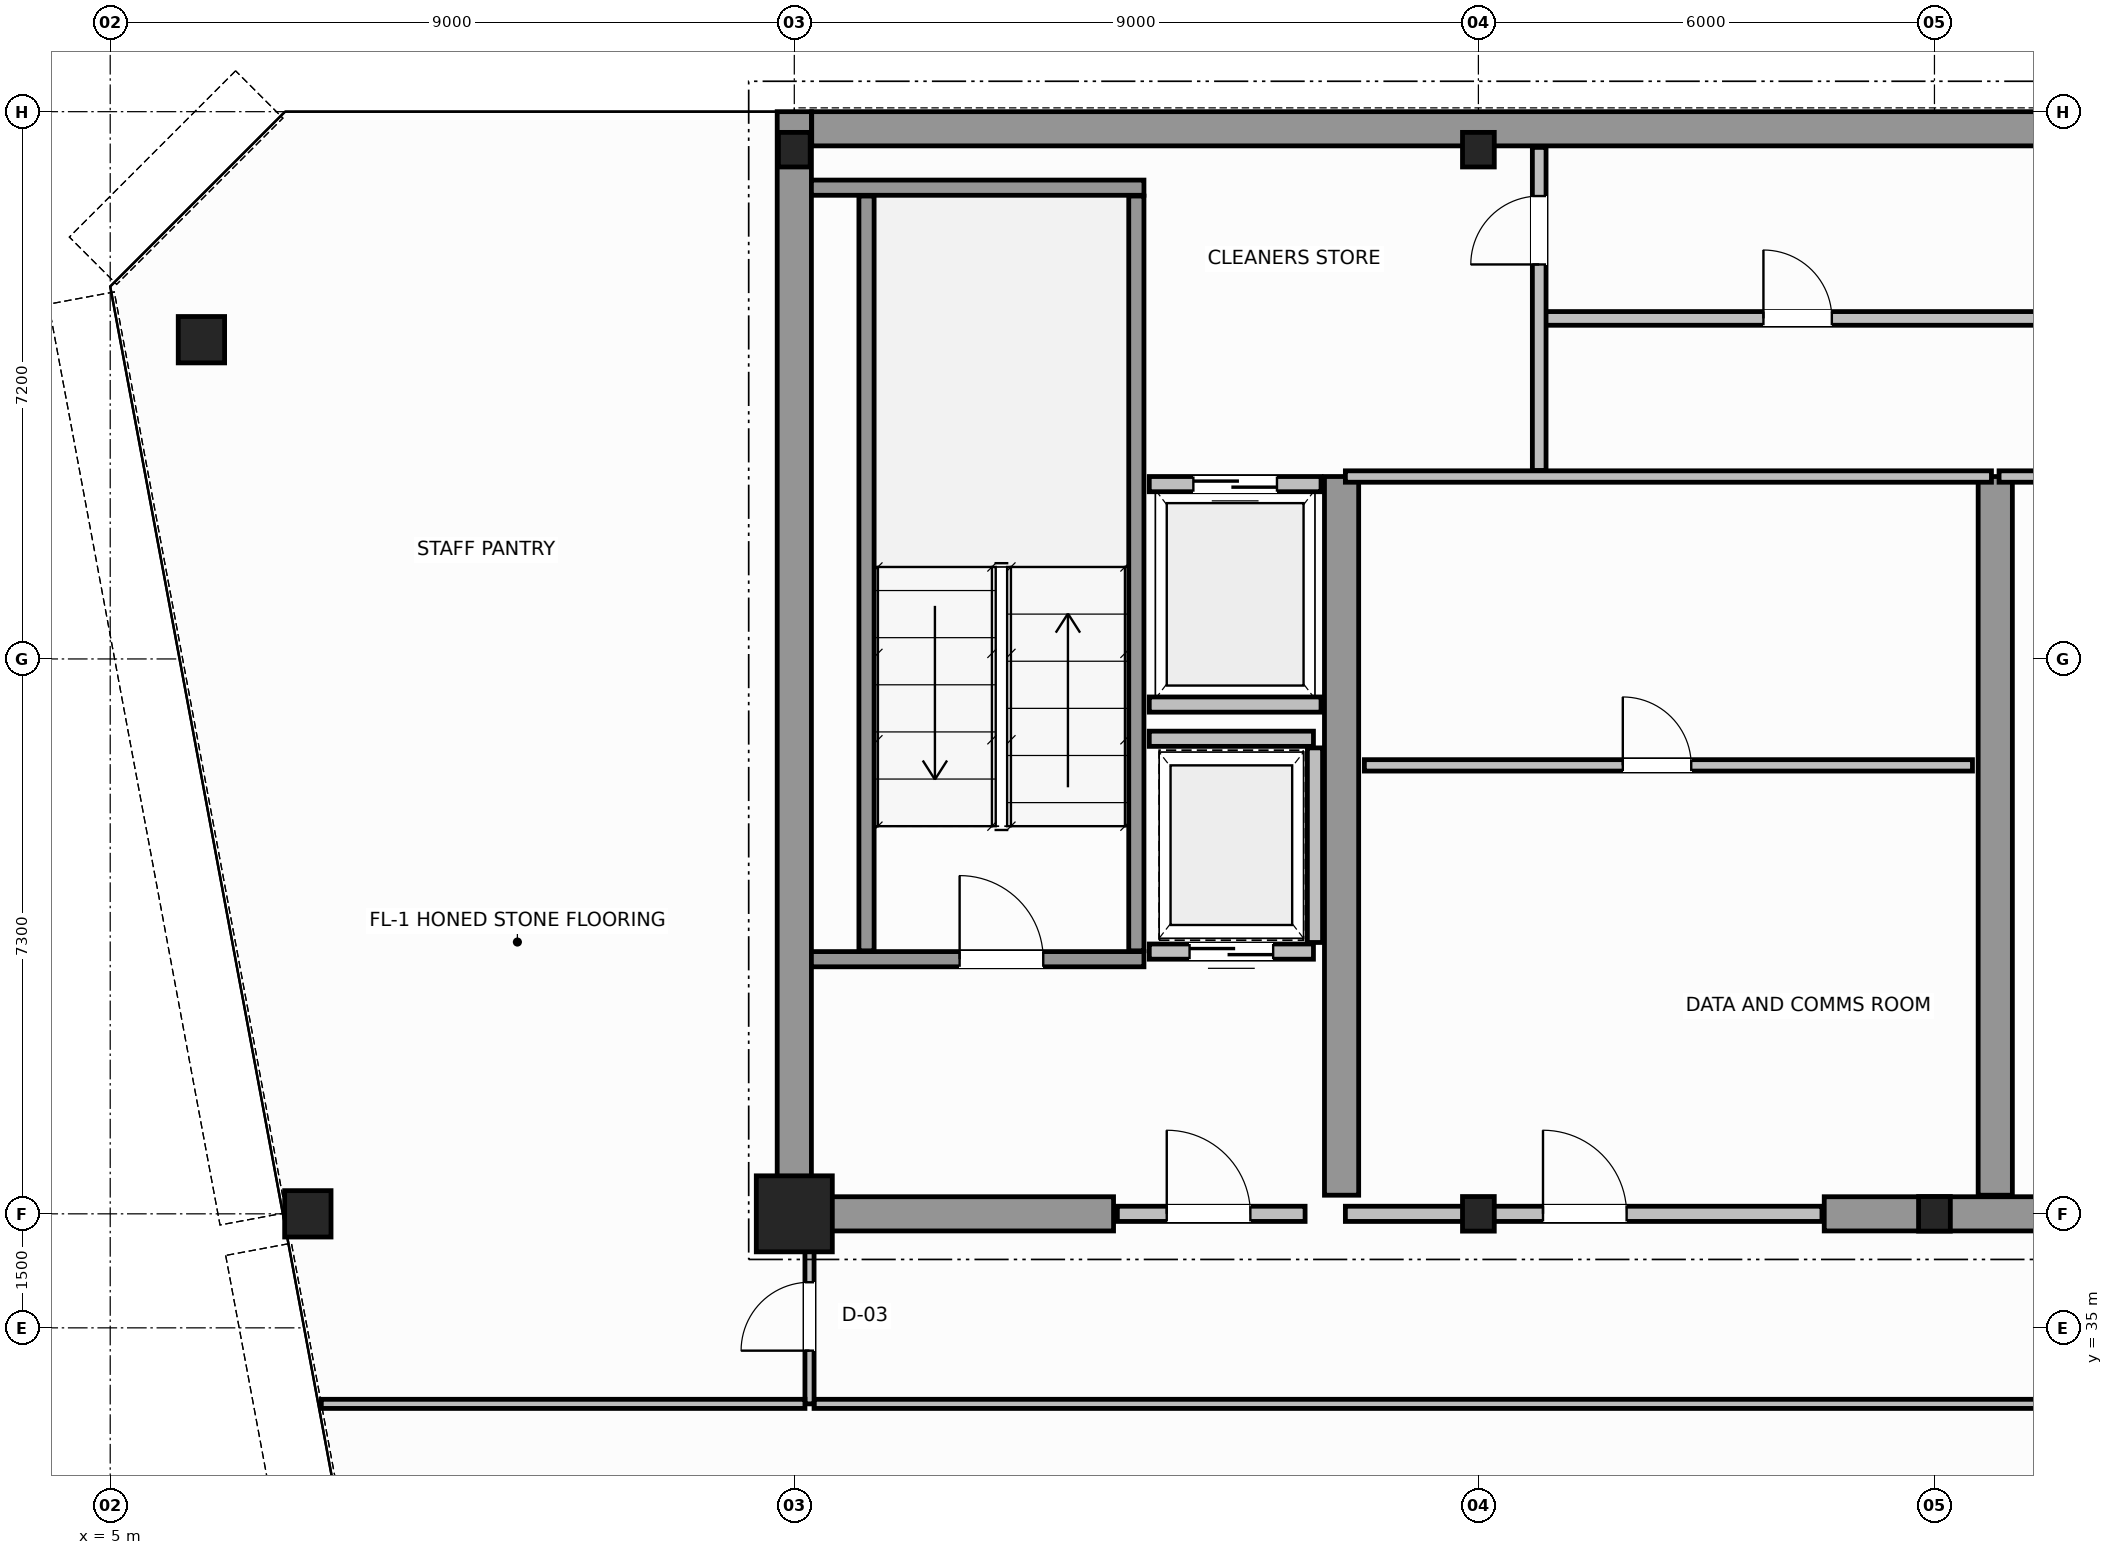
"""IFC4 building model, lengths in metres.
Left out: names, types, materials, properties, quantities, classifications, styles, units other than length and angle.
Written with IfcOpenShell. Run it as: python <this file> out.ifc"""

import sys

from ifc_helpers import new_model, si_unit, direction, frame, frame_2d, origin, origin_2d, place, context, subcontext, project, spatial, rectangle, hollow_circle, i_section, extrude, source, transform, mapped, element, fill, save


model = new_model("IFC4")
c1 = context("Model", 3, precision=1e-05, world=origin(), true_north=direction((0.0, 1.0)))
c2 = subcontext(c1, "Body", "Model", "MODEL_VIEW")
j1 = project(units=[si_unit("LENGTHUNIT", "METRE"), si_unit("PLANEANGLEUNIT", "RADIAN")], contexts=[c1])
p1 = place(None, origin())
s1 = spatial("IfcSite", under=j1, at=p1, CompositionType="ELEMENT")
p2 = place(p1, origin())
s2 = spatial("IfcBuilding", under=s1, at=p2, CompositionType="ELEMENT")
p3 = place(p2, frame((0.0, 0.0, 261.2)))
s3 = spatial("IfcBuildingStorey", under=s2, at=p3, CompositionType="ELEMENT", Elevation=261.2)
m1 = source(origin(), c2, "Body", "SweptSolid", [
    extrude(rectangle(XDim=1.0, YDim=1.0, at=origin_2d()), origin(), (0.0, 0.0, 1.0), 3.8),
])
p4 = place(p3, frame((14.0, 36.5, 0.0), z_axis=(0.0, 0.0, 1.0), x_axis=(1.0, 0.0, 0.0)))
e1 = element("IfcColumn", 1, at=p4, inside=s3, PredefinedType="COLUMN", context=c2, shape_type="MappedRepresentation", body=[
    mapped(m1, transform((0.0, 0.0, 0.0), scale=1.0)),
])
m2 = source(origin(), c2, "Body", "SweptSolid", [
    extrude(i_section(OverallWidth=0.418, OverallDepth=0.455, WebThickness=0.042, FlangeThickness=0.058, FilletRadius=0.015, at=origin_2d()), origin(), (0.0, 0.0, 1.0), 3.8),
])
for number, where, z_axis, x_axis in (
    (2, (23.0, 36.5, 0.0), (0.0, 0.0, 1.0), (1.0, 0.0, 0.0)),
    (3, (29.0, 36.5, 0.0), (0.0, 0.0, 1.0), (1.0, 0.0, 0.0)),
    (4, (14.0, 50.5, 0.0), (0.0, 0.0, 1.0), (1.0, 0.0, 0.0)),
    (5, (23.0, 50.5, 0.0), (0.0, 0.0, 1.0), (1.0, 0.0, 0.0)),
):
    element("IfcColumn", number, at=place(p3, frame(where, z_axis=z_axis, x_axis=x_axis)), inside=s3, PredefinedType="COLUMN", context=c2, shape_type="MappedRepresentation", body=[
        mapped(m2, transform((0.0, 0.0, 0.0), scale=1.0)),
    ])
m3 = source(origin(), c2, "Body", "SweptSolid", [
    extrude(hollow_circle(Radius=0.305, WallThickness=0.03, at=origin_2d()), origin(), (0.0, 0.0, 1.0), 3.8),
])
for number, where, z_axis, x_axis in (
    (6, (6.2, 48.0, 0.0), (0.0, 0.0, 1.0), (1.0, 0.0, 0.0)),
    (7, (7.6, 36.5, 0.0), (0.0, 0.0, 1.0), (1.0, 0.0, 0.0)),
):
    element("IfcColumn", number, at=place(p3, frame(where, z_axis=z_axis, x_axis=x_axis)), inside=s3, PredefinedType="COLUMN", context=c2, shape_type="MappedRepresentation", body=[
        mapped(m3, transform((0.0, 0.0, 0.0), scale=1.0)),
    ])
p5 = place(p3, frame((14.229, 50.775, 0.0), z_axis=(0.0, 0.0, 1.0), x_axis=(1.0, 0.0, 0.0)))
e8 = element("IfcWall", 8, at=p5, inside=s3, PredefinedType="SHEAR", context=c2, shape_type="SweptSolid", body=[
    extrude(rectangle(XDim=19.769, YDim=0.45, at=frame_2d((9.885, 0.0))), origin(), (0.0, 0.0, 1.0), 3.8),
])
p6 = place(p3, frame((14.0, 36.5, 0.0), z_axis=(0.0, 0.0, 1.0), x_axis=(0.0, 1.0, 0.0)))
e9 = element("IfcWall", 9, at=p6, inside=s3, PredefinedType="SHEAR", context=c2, shape_type="SweptSolid", body=[
    extrude(rectangle(XDim=14.5, YDim=0.45, at=frame_2d((7.25, 0.0))), origin(), (0.0, 0.0, 1.0), 3.8),
])
p7 = place(p3, frame((14.245, 36.5, 0.0), z_axis=(0.0, 0.0, 1.0), x_axis=(1.0, 0.0, 0.0)))
e10 = element("IfcWall", 10, at=p7, inside=s3, PredefinedType="SHEAR", context=c2, shape_type="SweptSolid", body=[
    extrude(rectangle(XDim=3.955, YDim=0.45, at=frame_2d((1.978, 0.0))), origin(), (0.0, 0.0, 1.0), 2.58),
])
p8 = place(p3, frame((27.55, 36.5, 0.0), z_axis=(0.0, 0.0, 1.0), x_axis=(1.0, 0.0, 0.0)))
e11 = element("IfcWall", 11, at=p8, inside=s3, PredefinedType="SHEAR", context=c2, shape_type="SweptSolid", body=[
    extrude(rectangle(XDim=4.5, YDim=0.45, at=frame_2d((2.25, 0.0))), origin(), (0.0, 0.0, 1.0), 3.8),
])
for number, where, z_axis, x_axis in (
    (12, (21.2, 36.745, 0.0), (0.0, 0.0, 1.0), (0.0, 1.0, 0.0)),
    (13, (29.8, 36.745, 0.0), (0.0, 0.0, 1.0), (0.0, 1.0, 0.0)),
):
    element("IfcWall", number, at=place(p3, frame(where, z_axis=z_axis, x_axis=x_axis)), inside=s3, PredefinedType="SHEAR", context=c2, shape_type="SweptSolid", body=[
        extrude(rectangle(XDim=9.455, YDim=0.45, at=frame_2d((4.728, 0.0))), origin(), (0.0, 0.0, 1.0), 3.8),
    ])
p9 = place(p3, frame((14.225, 39.85, 0.0), z_axis=(0.0, 0.0, 1.0), x_axis=(1.0, 0.0, 0.0)))
e14 = element("IfcWall", 14, at=p9, inside=s3, PredefinedType="SOLIDWALL", context=c2, shape_type="SweptSolid", body=[
    extrude(rectangle(XDim=4.375, YDim=0.2, at=frame_2d((2.188, 0.0))), origin(), (0.0, 0.0, 1.0), 3.8),
])
p10 = place(p9, frame((1.95, 0.0, 0.0)))
e15 = element("IfcOpeningElement", 15, at=p10, cuts=e14, PredefinedType="OPENING", context=c2, shape_type="SweptSolid", body=[
    extrude(rectangle(XDim=1.1, YDim=2.15, at=frame_2d((0.55, 1.075))), frame((0.0, 0.11, 0.0), z_axis=(0.0, -1.0, 0.0), x_axis=(1.0, 0.0, 0.0)), (0.0, 0.0, 1.0), 0.22),
])
p11 = place(p3, frame((14.225, 50.0, 0.0), z_axis=(0.0, 0.0, 1.0), x_axis=(1.0, 0.0, 0.0)))
e16 = element("IfcWall", 16, at=p11, inside=s3, PredefinedType="SOLIDWALL", context=c2, shape_type="SweptSolid", body=[
    extrude(rectangle(XDim=4.375, YDim=0.2, at=frame_2d((2.188, 0.0))), origin(), (0.0, 0.0, 1.0), 3.8),
])
for number, where, z_axis, x_axis in (
    (17, (14.95, 39.96, 0.0), (0.0, 0.0, 1.0), (0.0, 1.0, 0.0)),
    (18, (18.5, 39.96, 0.0), (0.0, 0.0, 1.0), (0.0, 1.0, 0.0)),
):
    element("IfcWall", number, at=place(p3, frame(where, z_axis=z_axis, x_axis=x_axis)), inside=s3, PredefinedType="SOLIDWALL", context=c2, shape_type="SweptSolid", body=[
        extrude(rectangle(XDim=9.93, YDim=0.2, at=frame_2d((4.965, 0.0))), origin(), (0.0, 0.0, 1.0), 3.8),
    ])
p12 = place(p3, frame((18.25, 36.5, 0.0), z_axis=(0.0, 0.0, 1.0), x_axis=(1.0, 0.0, 0.0)))
e19 = element("IfcWall", 19, at=p12, inside=s3, PredefinedType="SOLIDWALL", context=c2, shape_type="SweptSolid", body=[
    extrude(rectangle(XDim=2.47, YDim=0.2, at=frame_2d((1.235, 0.0))), origin(), (0.0, 0.0, 1.0), 2.57),
])
p13 = place(p12, frame((0.65, 0.0, 0.0)))
e20 = element("IfcOpeningElement", 20, at=p13, cuts=e19, PredefinedType="OPENING", context=c2, shape_type="SweptSolid", body=[
    extrude(rectangle(XDim=1.1, YDim=2.15, at=frame_2d((0.55, 1.075))), frame((0.0, 0.11, 0.0), z_axis=(0.0, -1.0, 0.0), x_axis=(1.0, 0.0, 0.0)), (0.0, 0.0, 1.0), 0.22),
])
p14 = place(p3, frame((18.67, 46.1, 0.0), z_axis=(0.0, 0.0, 1.0), x_axis=(1.0, 0.0, 0.0)))
e21 = element("IfcWall", 21, at=p14, inside=s3, PredefinedType="SOLIDWALL", context=c2, shape_type="SweptSolid", body=[
    extrude(rectangle(XDim=2.26, YDim=0.2, at=frame_2d((1.13, 0.0))), origin(), (0.0, 0.0, 1.0), 3.58),
])
p15 = place(p14, frame((0.58, 0.0, 0.0)))
e22 = element("IfcOpeningElement", 22, at=p15, cuts=e21, PredefinedType="OPENING", context=c2, shape_type="SweptSolid", body=[
    extrude(rectangle(XDim=1.1, YDim=2.15, at=frame_2d((0.55, 1.075))), frame((0.0, 0.11, 0.0), z_axis=(0.0, -1.0, 0.0), x_axis=(1.0, 0.0, 0.0)), (0.0, 0.0, 1.0), 0.22),
])
p16 = place(p3, frame((18.67, 43.2, 0.0), z_axis=(0.0, 0.0, 1.0), x_axis=(1.0, 0.0, 0.0)))
e23 = element("IfcWall", 23, at=p16, inside=s3, PredefinedType="SOLIDWALL", context=c2, shape_type="SweptSolid", body=[
    extrude(rectangle(XDim=2.26, YDim=0.2, at=frame_2d((1.13, 0.0))), origin(), (0.0, 0.0, 1.0), 3.58),
])
p17 = place(p3, frame((18.67, 39.95, 0.0), z_axis=(0.0, 0.0, 1.0), x_axis=(1.0, 0.0, 0.0)))
e24 = element("IfcWall", 24, at=p17, inside=s3, PredefinedType="SOLIDWALL", context=c2, shape_type="SweptSolid", body=[
    extrude(rectangle(XDim=2.16, YDim=0.2, at=frame_2d((1.08, 0.0))), origin(), (0.0, 0.0, 1.0), 3.58),
])
p18 = place(p17, frame((0.53, 0.0, 0.0)))
e25 = element("IfcOpeningElement", 25, at=p18, cuts=e24, PredefinedType="OPENING", context=c2, shape_type="SweptSolid", body=[
    extrude(rectangle(XDim=1.1, YDim=2.15, at=frame_2d((0.55, 1.075))), frame((0.0, 0.11, 0.0), z_axis=(0.0, -1.0, 0.0), x_axis=(1.0, 0.0, 0.0)), (0.0, 0.0, 1.0), 0.22),
])
p19 = place(p3, frame((18.67, 42.75, 0.0), z_axis=(0.0, 0.0, 1.0), x_axis=(1.0, 0.0, 0.0)))
e26 = element("IfcWall", 26, at=p19, inside=s3, PredefinedType="SOLIDWALL", context=c2, shape_type="SweptSolid", body=[
    extrude(rectangle(XDim=2.16, YDim=0.2, at=frame_2d((1.08, 0.0))), origin(), (0.0, 0.0, 1.0), 3.58),
])
p20 = place(p3, frame((20.85, 40.07, 0.0), z_axis=(0.0, 0.0, 1.0), x_axis=(0.0, 1.0, 0.0)))
e27 = element("IfcWall", 27, at=p20, inside=s3, PredefinedType="SOLIDWALL", context=c2, shape_type="SweptSolid", body=[
    extrude(rectangle(XDim=2.56, YDim=0.2, at=frame_2d((1.28, 0.0))), origin(), (0.0, 0.0, 1.0), 3.58),
])
p21 = place(p3, frame((21.25, 36.5, 0.0), z_axis=(0.0, 0.0, 1.0), x_axis=(1.0, 0.0, 0.0)))
e28 = element("IfcWall", 28, at=p21, inside=s3, PredefinedType="SOLIDWALL", context=c2, shape_type="SweptSolid", body=[
    extrude(rectangle(XDim=6.27, YDim=0.2, at=frame_2d((3.135, 0.0))), origin(), (0.0, 0.0, 1.0), 2.57),
])
p22 = place(p21, frame((2.6, 0.0, 0.0)))
e29 = element("IfcOpeningElement", 29, at=p22, cuts=e28, PredefinedType="OPENING", context=c2, shape_type="SweptSolid", body=[
    extrude(rectangle(XDim=1.1, YDim=2.15, at=frame_2d((0.55, 1.075))), frame((0.0, 0.11, 0.0), z_axis=(0.0, -1.0, 0.0), x_axis=(1.0, 0.0, 0.0)), (0.0, 0.0, 1.0), 0.22),
])
p23 = place(p3, frame((21.25, 46.2, 0.0), z_axis=(0.0, 0.0, 1.0), x_axis=(1.0, 0.0, 0.0)))
e30 = element("IfcWall", 30, at=p23, inside=s3, PredefinedType="PARTITIONING", context=c2, shape_type="SweptSolid", body=[
    extrude(rectangle(XDim=8.5, YDim=0.15, at=frame_2d((4.25, 0.0))), origin(), (0.0, 0.0, 1.0), 3.58),
])
p24 = place(p3, frame((21.5, 42.4, 0.0), z_axis=(0.0, 0.0, 1.0), x_axis=(1.0, 0.0, 0.0)))
e31 = element("IfcWall", 31, at=p24, inside=s3, PredefinedType="PARTITIONING", context=c2, shape_type="SweptSolid", body=[
    extrude(rectangle(XDim=8.0, YDim=0.15, at=frame_2d((4.0, 0.0))), origin(), (0.0, 0.0, 1.0), 3.58),
])
p25 = place(p24, frame((3.4, 0.0, 0.0)))
e32 = element("IfcOpeningElement", 32, at=p25, cuts=e31, PredefinedType="OPENING", context=c2, shape_type="SweptSolid", body=[
    extrude(rectangle(XDim=0.9, YDim=2.1, at=frame_2d((0.45, 1.05))), frame((0.0, 0.085, 0.0), z_axis=(0.0, -1.0, 0.0), x_axis=(1.0, 0.0, 0.0)), (0.0, 0.0, 1.0), 0.17),
])
p26 = place(p3, frame((29.85, 46.2, 0.0), z_axis=(0.0, 0.0, 1.0), x_axis=(1.0, 0.0, 0.0)))
e33 = element("IfcWall", 33, at=p26, inside=s3, PredefinedType="PARTITIONING", context=c2, shape_type="SweptSolid", body=[
    extrude(rectangle(XDim=8.5, YDim=0.15, at=frame_2d((4.25, 0.0))), origin(), (0.0, 0.0, 1.0), 3.58),
])
p27 = place(p3, frame((23.85, 48.28, 0.0), z_axis=(0.0, 0.0, 1.0), x_axis=(1.0, 0.0, 0.0)))
e34 = element("IfcWall", 34, at=p27, inside=s3, PredefinedType="PLUMBINGWALL", context=c2, shape_type="SweptSolid", body=[
    extrude(rectangle(XDim=15.03, YDim=0.18, at=frame_2d((7.515, 0.0))), origin(), (0.0, 0.0, 1.0), 3.58),
])
p28 = place(p27, frame((2.9, 0.0, 0.0)))
e35 = element("IfcOpeningElement", 35, at=p28, cuts=e34, PredefinedType="OPENING", context=c2, shape_type="SweptSolid", body=[
    extrude(rectangle(XDim=0.9, YDim=2.15, at=frame_2d((0.45, 1.075))), frame((0.0, 0.1, 0.0), z_axis=(0.0, -1.0, 0.0), x_axis=(1.0, 0.0, 0.0)), (0.0, 0.0, 1.0), 0.2),
])
p29 = place(p27, frame((10.4, 0.0, 0.0)))
e36 = element("IfcOpeningElement", 36, at=p29, cuts=e34, PredefinedType="OPENING", context=c2, shape_type="SweptSolid", body=[
    extrude(rectangle(XDim=0.9, YDim=2.15, at=frame_2d((0.45, 1.075))), frame((0.0, 0.1, 0.0), z_axis=(0.0, -1.0, 0.0), x_axis=(1.0, 0.0, 0.0)), (0.0, 0.0, 1.0), 0.2),
])
p30 = place(p3, frame((23.8, 46.28, 0.0), z_axis=(0.0, 0.0, 1.0), x_axis=(0.0, 1.0, 0.0)))
e37 = element("IfcWall", 37, at=p30, inside=s3, PredefinedType="PLUMBINGWALL", context=c2, shape_type="SweptSolid", body=[
    extrude(rectangle(XDim=4.25, YDim=0.18, at=frame_2d((2.125, 0.0))), origin(), (0.0, 0.0, 1.0), 3.58),
])
p31 = place(p30, frame((2.71, 0.0, 0.0)))
e38 = element("IfcOpeningElement", 38, at=p31, cuts=e37, PredefinedType="OPENING", context=c2, shape_type="SweptSolid", body=[
    extrude(rectangle(XDim=0.9, YDim=2.15, at=frame_2d((0.45, 1.075))), frame((0.0, 0.1, 0.0), z_axis=(0.0, -1.0, 0.0), x_axis=(1.0, 0.0, 0.0)), (0.0, 0.0, 1.0), 0.2),
])
p32 = place(p3, frame((14.26, 34.0, 0.0), z_axis=(0.0, 0.0, 1.0), x_axis=(1.0, 0.0, 0.0)))
e39 = element("IfcWall", 39, at=p32, inside=s3, PredefinedType="PARTITIONING", context=c2, shape_type="SweptSolid", body=[
    extrude(rectangle(XDim=16.48, YDim=0.12, at=frame_2d((8.24, 0.0))), origin(), (0.0, 0.0, 1.0), 3.58),
])
p33 = place(p3, frame((14.2, 34.0, 0.0), z_axis=(0.0, 0.0, 1.0), x_axis=(0.0, 1.0, 0.0)))
e40 = element("IfcWall", 40, at=p33, inside=s3, PredefinedType="PARTITIONING", context=c2, shape_type="SweptSolid", body=[
    extrude(rectangle(XDim=2.44, YDim=0.12, at=frame_2d((1.22, 0.0))), origin(), (0.0, 0.0, 1.0), 3.58),
])
p34 = place(p33, frame((0.7, 0.0, 0.0)))
e41 = element("IfcOpeningElement", 41, at=p34, cuts=e40, PredefinedType="OPENING", context=c2, shape_type="SweptSolid", body=[
    extrude(rectangle(XDim=0.9, YDim=2.15, at=frame_2d((0.45, 1.075))), frame((0.0, 0.07, 0.0), z_axis=(0.0, -1.0, 0.0), x_axis=(1.0, 0.0, 0.0)), (0.0, 0.0, 1.0), 0.14),
])
p35 = place(p3, frame((7.777, 34.0, 0.0), z_axis=(0.0, 0.0, 1.0), x_axis=(1.0, 0.0, 0.0)))
e42 = element("IfcWall", 42, at=p35, inside=s3, PredefinedType="PARTITIONING", context=c2, shape_type="SweptSolid", body=[
    extrude(rectangle(XDim=6.363, YDim=0.12, at=frame_2d((3.181, 0.0))), origin(), (0.0, 0.0, 1.0), 3.58),
])
m4 = source(origin(), c2, "Body", "SweptSolid", [
    extrude(rectangle(XDim=1.1, YDim=2.15, at=frame_2d((0.55, 1.075))), frame((0.0, 0.025, 0.0), z_axis=(0.0, -1.0, 0.0), x_axis=(1.0, 0.0, 0.0)), (0.0, 0.0, 1.0), 0.05),
])
p36 = place(p10, origin())
e43 = element("IfcDoor", 43, at=p36, inside=s3, OperationType="SINGLE_SWING_LEFT", PredefinedType="DOOR", context=c2, shape_type="MappedRepresentation", body=[
    mapped(m4, transform((0.0, 0.0, 0.0), scale=1.0)),
])
fill(e15, e43)
p37 = place(p13, origin())
e44 = element("IfcDoor", 44, at=p37, inside=s3, OperationType="SINGLE_SWING_RIGHT", PredefinedType="DOOR", context=c2, shape_type="MappedRepresentation", body=[
    mapped(m4, transform((0.0, 0.0, 0.0), scale=1.0)),
])
fill(e20, e44)
p38 = place(p15, origin())
e45 = element("IfcDoor", 45, at=p38, inside=s3, OperationType="DOUBLE_DOOR_SLIDING", PredefinedType="DOOR", context=c2, shape_type="MappedRepresentation", body=[
    mapped(m4, transform((0.0, 0.0, 0.0), scale=1.0)),
])
fill(e22, e45)
p39 = place(p18, origin())
e46 = element("IfcDoor", 46, at=p39, inside=s3, OperationType="DOUBLE_DOOR_SLIDING", PredefinedType="DOOR", context=c2, shape_type="MappedRepresentation", body=[
    mapped(m4, transform((0.0, 0.0, 0.0), scale=1.0)),
])
fill(e25, e46)
p40 = place(p22, origin())
e47 = element("IfcDoor", 47, at=p40, inside=s3, OperationType="SINGLE_SWING_LEFT", PredefinedType="DOOR", context=c2, shape_type="MappedRepresentation", body=[
    mapped(m4, transform((0.0, 0.0, 0.0), scale=1.0)),
])
fill(e29, e47)
m5 = source(origin(), c2, "Body", "SweptSolid", [
    extrude(rectangle(XDim=0.9, YDim=2.1, at=frame_2d((0.45, 1.05))), frame((0.0, 0.025, 0.0), z_axis=(0.0, -1.0, 0.0), x_axis=(1.0, 0.0, 0.0)), (0.0, 0.0, 1.0), 0.05),
])
p41 = place(p25, origin())
e48 = element("IfcDoor", 48, at=p41, inside=s3, OperationType="SINGLE_SWING_RIGHT", PredefinedType="DOOR", context=c2, shape_type="MappedRepresentation", body=[
    mapped(m5, transform((0.0, 0.0, 0.0), scale=1.0)),
])
fill(e32, e48)
m6 = source(origin(), c2, "Body", "SweptSolid", [
    extrude(rectangle(XDim=0.9, YDim=2.15, at=frame_2d((0.45, 1.075))), frame((0.0, 0.025, 0.0), z_axis=(0.0, -1.0, 0.0), x_axis=(1.0, 0.0, 0.0)), (0.0, 0.0, 1.0), 0.05),
])
p42 = place(p31, origin())
e49 = element("IfcDoor", 49, at=p42, inside=s3, OperationType="SINGLE_SWING_LEFT", PredefinedType="DOOR", context=c2, shape_type="MappedRepresentation", body=[
    mapped(m6, transform((0.0, 0.0, 0.0), scale=1.0)),
])
fill(e38, e49)
p43 = place(p28, origin())
e50 = element("IfcDoor", 50, at=p43, inside=s3, OperationType="SINGLE_SWING_RIGHT", PredefinedType="DOOR", context=c2, shape_type="MappedRepresentation", body=[
    mapped(m6, transform((0.0, 0.0, 0.0), scale=1.0)),
])
fill(e35, e50)
p44 = place(p34, origin())
e51 = element("IfcDoor", 51, at=p44, inside=s3, OperationType="SINGLE_SWING_LEFT", PredefinedType="DOOR", context=c2, shape_type="MappedRepresentation", body=[
    mapped(m6, transform((0.0, 0.0, 0.0), scale=1.0)),
])
fill(e41, e51)
save(model, sys.argv[1])
